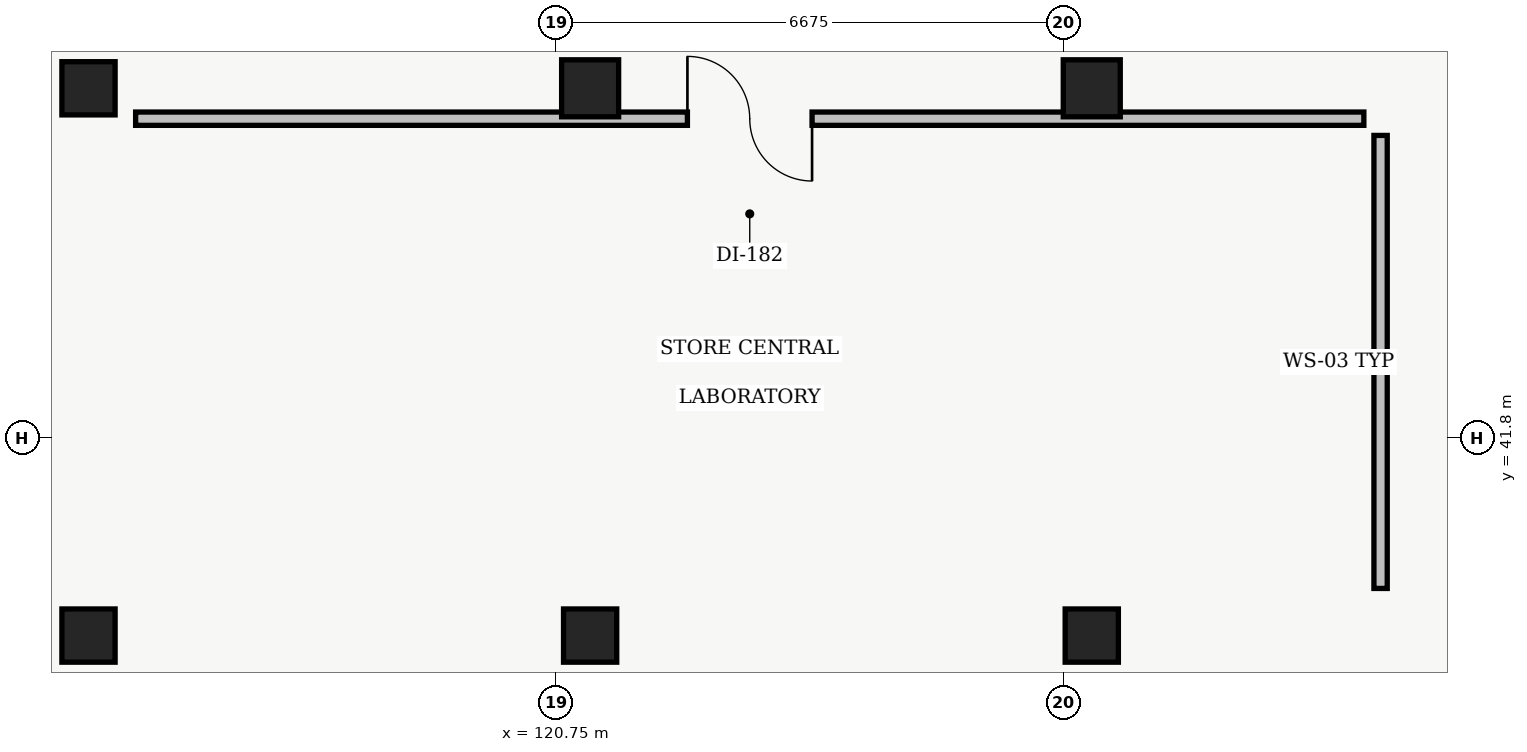
"""IFC4 building model, lengths in metres.
Left out: names, types, materials, properties, quantities, classifications, styles, units other than length and angle.
Written with IfcOpenShell. Run it as: python <this file> out.ifc"""

import sys

from ifc_helpers import new_model, si_unit, direction, frame, frame_2d, origin, origin_2d, place, context, subcontext, project, spatial, rectangle, extrude, element, fill, save


model = new_model("IFC4")
c1 = context("Model", 3, precision=1e-05, world=origin(), true_north=direction((0.0, 1.0)))
c2 = subcontext(c1, "Body", "Model", "MODEL_VIEW")
j1 = project(units=[si_unit("LENGTHUNIT", "METRE"), si_unit("PLANEANGLEUNIT", "RADIAN")], contexts=[c1])
p1 = place(None, origin())
s1 = spatial("IfcSite", under=j1, at=p1, CompositionType="ELEMENT")
p2 = place(p1, origin())
s2 = spatial("IfcBuilding", under=s1, at=p2, CompositionType="ELEMENT")
p3 = place(p2, frame((0.0, 0.0, -4.8)))
s3 = spatial("IfcBuildingStorey", under=s2, at=p3, CompositionType="ELEMENT", Elevation=-4.8)
for number, where, z_axis, x_axis in (
    (1, (114.6, 39.2, 0.0), (0.0, 0.0, 1.0), (1.0, 0.0, 0.0)),
    (2, (114.6, 46.4, 0.0), (0.0, 0.0, 1.0), (1.0, 0.0, 0.0)),
    (3, (121.2, 39.2, 0.0), (0.0, 0.0, 1.0), (1.0, 0.0, 0.0)),
):
    element("IfcColumn", number, at=place(p3, frame(where, z_axis=z_axis, x_axis=x_axis)), inside=s3, PredefinedType="COLUMN", context=c2, shape_type="SweptSolid", body=[
        extrude(rectangle(XDim=0.7, YDim=0.7, at=origin_2d()), origin(), (0.0, 0.0, 1.0), 4.59),
    ])
p4 = place(p3, frame((121.2, 46.4, 0.0), z_axis=(0.0, 0.0, 1.0), x_axis=(1.0, 0.0, 0.0)))
e4 = element("IfcColumn", 4, at=p4, inside=s3, PredefinedType="COLUMN", context=c2, shape_type="SweptSolid", body=[
    extrude(rectangle(XDim=0.75, YDim=0.75, at=origin_2d()), origin(), (0.0, 0.0, 1.0), 4.59),
])
p5 = place(p3, frame((127.8, 39.2, 0.0), z_axis=(0.0, 0.0, 1.0), x_axis=(1.0, 0.0, 0.0)))
e5 = element("IfcColumn", 5, at=p5, inside=s3, PredefinedType="COLUMN", context=c2, shape_type="SweptSolid", body=[
    extrude(rectangle(XDim=0.7, YDim=0.7, at=origin_2d()), origin(), (0.0, 0.0, 1.0), 4.59),
])
p6 = place(p3, frame((127.8, 46.4, 0.0), z_axis=(0.0, 0.0, 1.0), x_axis=(1.0, 0.0, 0.0)))
e6 = element("IfcColumn", 6, at=p6, inside=s3, PredefinedType="COLUMN", context=c2, shape_type="SweptSolid", body=[
    extrude(rectangle(XDim=0.75, YDim=0.75, at=origin_2d()), origin(), (0.0, 0.0, 1.0), 4.59),
])
p7 = place(p3, frame((131.6, 39.82, 0.0), z_axis=(0.0, 0.0, 1.0), x_axis=(0.0, 1.0, 0.0)))
e7 = element("IfcWall", 7, at=p7, inside=s3, PredefinedType="SOLIDWALL", context=c2, shape_type="SweptSolid", body=[
    extrude(rectangle(XDim=5.96, YDim=0.175, at=frame_2d((2.98, 0.0))), origin(), (0.0, 0.0, 1.0), 4.25),
])
p8 = place(p3, frame((131.38, 46.0, 0.0), z_axis=(0.0, 0.0, 1.0), x_axis=(-1.0, 0.0, 0.0)))
e8 = element("IfcWall", 8, at=p8, inside=s3, PredefinedType="SOLIDWALL", context=c2, shape_type="SweptSolid", body=[
    extrude(rectangle(XDim=16.16, YDim=0.175, at=frame_2d((8.08, 0.0))), origin(), (0.0, 0.0, 1.0), 4.25),
])
p9 = place(p8, frame((7.26, 0.0, 0.0)))
e9 = element("IfcOpeningElement", 9, at=p9, cuts=e8, PredefinedType="OPENING", context=c2, shape_type="SweptSolid", body=[
    extrude(rectangle(XDim=1.64, YDim=2.2, at=frame_2d((0.82, 1.1))), frame((0.0, 0.087, 0.0), z_axis=(0.0, -1.0, 0.0), x_axis=(1.0, 0.0, 0.0)), (0.0, 0.0, 1.0), 0.175),
])
p10 = place(p9, origin())
e10 = element("IfcDoor", 10, at=p10, inside=s3, OperationType="DOUBLE_DOOR_SINGLE_SWING", PredefinedType="DOOR", context=c2, shape_type="SweptSolid", body=[
    extrude(rectangle(XDim=1.64, YDim=2.2, at=frame_2d((0.82, 1.1))), frame((0.0, 0.025, 0.0), z_axis=(0.0, -1.0, 0.0), x_axis=(1.0, 0.0, 0.0)), (0.0, 0.0, 1.0), 0.05),
])
fill(e9, e10)
save(model, sys.argv[1])
